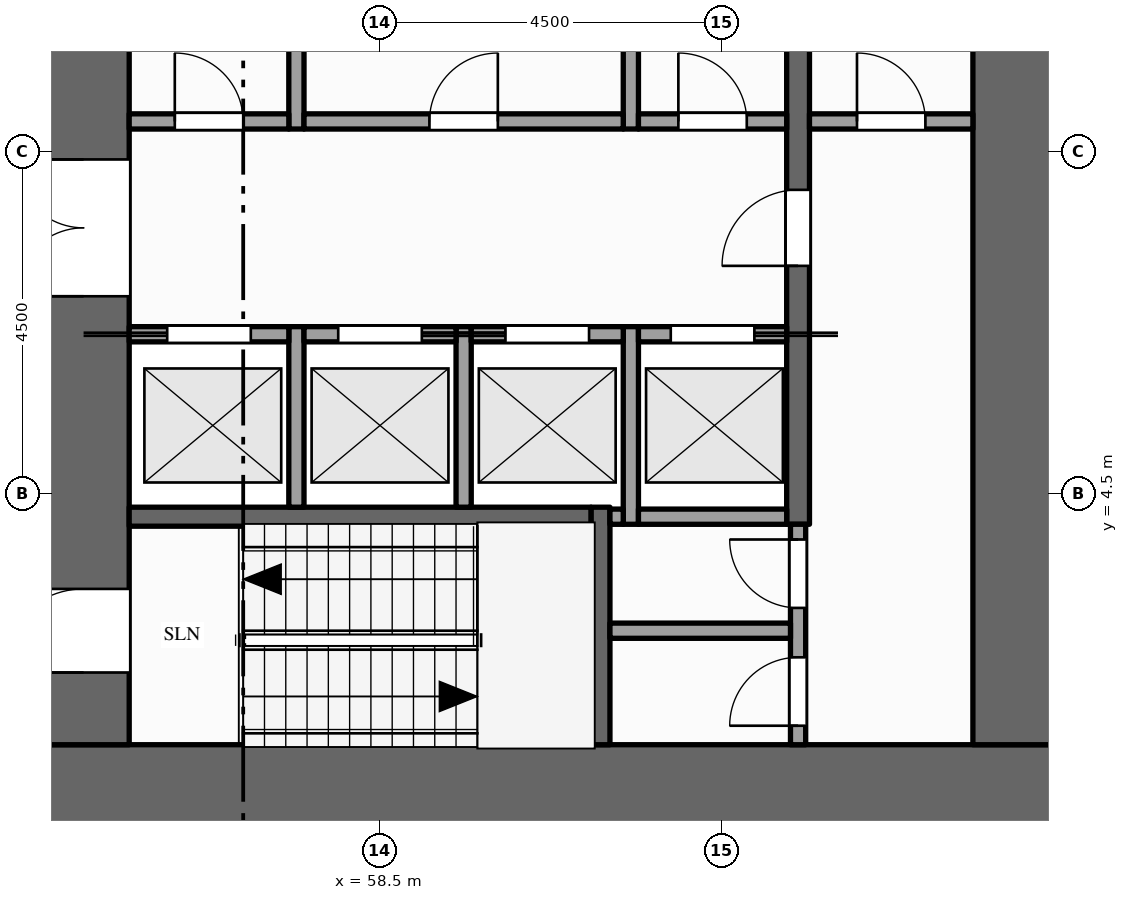
"""IFC4 building model, lengths in metres.
Left out: names, types, materials, properties, quantities, classifications, styles, units other than length and angle.
Written with IfcOpenShell. Run it as: python <this file> out.ifc"""

import sys

from ifc_helpers import new_model, si_unit, direction, frame, frame_2d, origin, place, context, subcontext, project, spatial, rectangle, extrude, element, fill, save


model = new_model("IFC4")
c1 = context("Model", 3, precision=1e-05, world=origin(), true_north=direction((0.0, 1.0)))
c2 = subcontext(c1, "Body", "Model", "MODEL_VIEW")
j1 = project(units=[si_unit("LENGTHUNIT", "METRE"), si_unit("PLANEANGLEUNIT", "RADIAN")], contexts=[c1])
p1 = place(None, origin())
s1 = spatial("IfcSite", under=j1, at=p1, CompositionType="ELEMENT")
p2 = place(p1, origin())
s2 = spatial("IfcBuilding", under=s1, at=p2, CompositionType="ELEMENT")
p3 = place(p2, frame((0.0, 0.0, 45.0)))
s3 = spatial("IfcBuildingStorey", under=s2, at=p3, CompositionType="ELEMENT", Elevation=45.0)
p4 = place(p3, frame((67.5, 0.6, -0.15), z_axis=(0.0, 0.0, 1.0), x_axis=(-1.0, 0.0, 0.0)))
e1 = element("IfcWall", 1, at=p4, inside=s3, PredefinedType="SHEAR", context=c2, shape_type="SweptSolid", body=[
    extrude(rectangle(XDim=13.5, YDim=1.2, at=frame_2d((6.75, 0.0))), origin(), (0.0, 0.0, 1.0), 4.0),
])
p5 = place(p3, frame((54.6, 1.2, -0.15), z_axis=(0.0, 0.0, 1.0), x_axis=(0.0, 1.0, 0.0)))
e2 = element("IfcWall", 2, at=p5, inside=s3, PredefinedType="SHEAR", context=c2, shape_type="SweptSolid", body=[
    extrude(rectangle(XDim=20.1, YDim=1.2, at=frame_2d((10.05, 0.0))), origin(), (0.0, 0.0, 1.0), 4.0),
])
p6 = place(p5, frame((5.9, 0.0, 0.15)))
e3 = element("IfcOpeningElement", 3, at=p6, cuts=e2, PredefinedType="OPENING", context=c2, shape_type="SweptSolid", body=[
    extrude(rectangle(XDim=1.8, YDim=2.1, at=frame_2d((0.9, 1.05))), frame((0.0, 0.61, 0.0), z_axis=(0.0, -1.0, 0.0), x_axis=(1.0, 0.0, 0.0)), (0.0, 0.0, 1.0), 1.22),
])
p7 = place(p5, frame((11.95, 0.0, 0.15)))
e4 = element("IfcOpeningElement", 4, at=p7, cuts=e2, PredefinedType="OPENING", context=c2, shape_type="SweptSolid", body=[
    extrude(rectangle(XDim=1.1, YDim=2.1, at=frame_2d((0.55, 1.05))), frame((0.0, 0.61, 0.0), z_axis=(0.0, -1.0, 0.0), x_axis=(1.0, 0.0, 0.0)), (0.0, 0.0, 1.0), 1.22),
])
p8 = place(p5, frame((0.95, 0.0, 0.15)))
e5 = element("IfcOpeningElement", 5, at=p8, cuts=e2, PredefinedType="OPENING", context=c2, shape_type="SweptSolid", body=[
    extrude(rectangle(XDim=1.1, YDim=2.1, at=frame_2d((0.55, 1.05))), frame((0.0, 0.61, 0.0), z_axis=(0.0, -1.0, 0.0), x_axis=(1.0, 0.0, 0.0)), (0.0, 0.0, 1.0), 1.22),
])
p9 = place(p5, frame((18.15, 0.0, 0.15)))
e6 = element("IfcOpeningElement", 6, at=p9, cuts=e2, PredefinedType="OPENING", context=c2, shape_type="SweptSolid", body=[
    extrude(rectangle(XDim=1.1, YDim=2.1, at=frame_2d((0.55, 1.05))), frame((0.0, 0.61, 0.0), z_axis=(0.0, -1.0, 0.0), x_axis=(1.0, 0.0, 0.0)), (0.0, 0.0, 1.0), 1.22),
])
p10 = place(p3, frame((66.9, 1.2, -0.15), z_axis=(0.0, 0.0, 1.0), x_axis=(0.0, 1.0, 0.0)))
e7 = element("IfcWall", 7, at=p10, inside=s3, PredefinedType="SHEAR", context=c2, shape_type="SweptSolid", body=[
    extrude(rectangle(XDim=20.1, YDim=1.2, at=frame_2d((10.05, 0.0))), origin(), (0.0, 0.0, 1.0), 4.0),
])
p11 = place(p3, frame((57.4, 4.325, 0.0), z_axis=(0.0, 0.0, 1.0), x_axis=(0.0, 1.0, 0.0)))
e8 = element("IfcWall", 8, at=p11, inside=s3, PredefinedType="SOLIDWALL", context=c2, shape_type="SweptSolid", body=[
    extrude(rectangle(XDim=2.375, YDim=0.2, at=frame_2d((1.188, 0.0))), origin(), (0.0, 0.0, 1.0), 3.85),
])
p12 = place(p3, frame((57.4, 9.3, 0.0), z_axis=(0.0, 0.0, 1.0), x_axis=(0.0, 1.0, 0.0)))
e9 = element("IfcWall", 9, at=p12, inside=s3, PredefinedType="PARTITIONING", context=c2, shape_type="SweptSolid", body=[
    extrude(rectangle(XDim=2.6, YDim=0.2, at=frame_2d((1.3, 0.0))), origin(), (0.0, 0.0, 1.0), 3.85),
])
p13 = place(p3, frame((59.6, 4.325, 0.0), z_axis=(0.0, 0.0, 1.0), x_axis=(0.0, 1.0, 0.0)))
e10 = element("IfcWall", 10, at=p13, inside=s3, PredefinedType="SOLIDWALL", context=c2, shape_type="SweptSolid", body=[
    extrude(rectangle(XDim=2.375, YDim=0.2, at=frame_2d((1.188, 0.0))), origin(), (0.0, 0.0, 1.0), 3.85),
])
p14 = place(p3, frame((61.4, 1.2, 0.0), z_axis=(0.0, 0.0, 1.0), x_axis=(0.0, 1.0, 0.0)))
e11 = element("IfcWall", 11, at=p14, inside=s3, PredefinedType="SHEAR", context=c2, shape_type="SweptSolid", body=[
    extrude(rectangle(XDim=3.125, YDim=0.25, at=frame_2d((1.562, 0.0))), origin(), (0.0, 0.0, 1.0), 3.85),
])
p15 = place(p3, frame((61.8, 4.1, 0.0), z_axis=(0.0, 0.0, 1.0), x_axis=(0.0, 1.0, 0.0)))
e12 = element("IfcWall", 12, at=p15, inside=s3, PredefinedType="SOLIDWALL", context=c2, shape_type="SweptSolid", body=[
    extrude(rectangle(XDim=2.6, YDim=0.2, at=frame_2d((1.3, 0.0))), origin(), (0.0, 0.0, 1.0), 3.85),
])
p16 = place(p3, frame((61.8, 9.3, 0.0), z_axis=(0.0, 0.0, 1.0), x_axis=(0.0, 1.0, 0.0)))
e13 = element("IfcWall", 13, at=p16, inside=s3, PredefinedType="PARTITIONING", context=c2, shape_type="SweptSolid", body=[
    extrude(rectangle(XDim=2.6, YDim=0.2, at=frame_2d((1.3, 0.0))), origin(), (0.0, 0.0, 1.0), 3.85),
])
p17 = place(p3, frame((64.0, 1.2, 0.0), z_axis=(0.0, 0.0, 1.0), x_axis=(0.0, 1.0, 0.0)))
e14 = element("IfcWall", 14, at=p17, inside=s3, PredefinedType="PARTITIONING", context=c2, shape_type="SweptSolid", body=[
    extrude(rectangle(XDim=2.9, YDim=0.2, at=frame_2d((1.45, 0.0))), origin(), (0.0, 0.0, 1.0), 3.85),
])
p18 = place(p17, frame((0.25, 0.0, 0.0)))
e15 = element("IfcOpeningElement", 15, at=p18, cuts=e14, PredefinedType="OPENING", context=c2, shape_type="SweptSolid", body=[
    extrude(rectangle(XDim=0.9, YDim=2.1, at=frame_2d((0.45, 1.05))), frame((0.0, 0.11, 0.0), z_axis=(0.0, -1.0, 0.0), x_axis=(1.0, 0.0, 0.0)), (0.0, 0.0, 1.0), 0.22),
])
p19 = place(p17, frame((1.8, 0.0, 0.0)))
e16 = element("IfcOpeningElement", 16, at=p19, cuts=e14, PredefinedType="OPENING", context=c2, shape_type="SweptSolid", body=[
    extrude(rectangle(XDim=0.9, YDim=2.1, at=frame_2d((0.45, 1.05))), frame((0.0, 0.11, 0.0), z_axis=(0.0, -1.0, 0.0), x_axis=(1.0, 0.0, 0.0)), (0.0, 0.0, 1.0), 0.22),
])
p20 = place(p3, frame((64.0, 4.1, 0.0), z_axis=(0.0, 0.0, 1.0), x_axis=(0.0, 1.0, 0.0)))
e17 = element("IfcWall", 17, at=p20, inside=s3, PredefinedType="SHEAR", context=c2, shape_type="SweptSolid", body=[
    extrude(rectangle(XDim=14.5, YDim=0.3, at=frame_2d((7.25, 0.0))), origin(), (0.0, 0.0, 1.0), 3.85),
])
p21 = place(p20, frame((3.4, 0.0, 0.0)))
e18 = element("IfcOpeningElement", 18, at=p21, cuts=e17, PredefinedType="OPENING", context=c2, shape_type="SweptSolid", body=[
    extrude(rectangle(XDim=1.0, YDim=2.1, at=frame_2d((0.5, 1.05))), frame((0.0, 0.16, 0.0), z_axis=(0.0, -1.0, 0.0), x_axis=(1.0, 0.0, 0.0)), (0.0, 0.0, 1.0), 0.32),
])
p22 = place(p20, frame((9.1, 0.0, 0.0)))
e19 = element("IfcOpeningElement", 19, at=p22, cuts=e17, PredefinedType="OPENING", context=c2, shape_type="SweptSolid", body=[
    extrude(rectangle(XDim=1.0, YDim=2.1, at=frame_2d((0.5, 1.05))), frame((0.0, 0.16, 0.0), z_axis=(0.0, -1.0, 0.0), x_axis=(1.0, 0.0, 0.0)), (0.0, 0.0, 1.0), 0.32),
])
p23 = place(p3, frame((61.525, 2.7, 0.0), z_axis=(0.0, 0.0, 1.0), x_axis=(1.0, 0.0, 0.0)))
e20 = element("IfcWall", 20, at=p23, inside=s3, PredefinedType="PARTITIONING", context=c2, shape_type="SweptSolid", body=[
    extrude(rectangle(XDim=2.375, YDim=0.2, at=frame_2d((1.188, 0.0))), origin(), (0.0, 0.0, 1.0), 3.85),
])
p24 = place(p3, frame((55.2, 4.2, 0.0), z_axis=(0.0, 0.0, 1.0), x_axis=(1.0, 0.0, 0.0)))
e21 = element("IfcWall", 21, at=p24, inside=s3, PredefinedType="SHEAR", context=c2, shape_type="SweptSolid", body=[
    extrude(rectangle(XDim=6.075, YDim=0.25, at=frame_2d((3.038, 0.0))), origin(), (0.0, 0.0, 1.0), 3.85),
])
p25 = place(p3, frame((61.525, 4.2, 0.0), z_axis=(0.0, 0.0, 1.0), x_axis=(1.0, 0.0, 0.0)))
e22 = element("IfcWall", 22, at=p25, inside=s3, PredefinedType="SOLIDWALL", context=c2, shape_type="SweptSolid", body=[
    extrude(rectangle(XDim=0.175, YDim=0.2, at=frame_2d((0.087, 0.0))), origin(), (0.0, 0.0, 1.0), 3.85),
])
p26 = place(p3, frame((61.9, 4.2, 0.0), z_axis=(0.0, 0.0, 1.0), x_axis=(1.0, 0.0, 0.0)))
e23 = element("IfcWall", 23, at=p26, inside=s3, PredefinedType="SOLIDWALL", context=c2, shape_type="SweptSolid", body=[
    extrude(rectangle(XDim=1.95, YDim=0.2, at=frame_2d((0.975, 0.0))), origin(), (0.0, 0.0, 1.0), 3.85),
])
p27 = place(p3, frame((55.2, 6.6, 0.0), z_axis=(0.0, 0.0, 1.0), x_axis=(1.0, 0.0, 0.0)))
e24 = element("IfcWall", 24, at=p27, inside=s3, PredefinedType="SOLIDWALL", context=c2, shape_type="SweptSolid", body=[
    extrude(rectangle(XDim=2.1, YDim=0.2, at=frame_2d((1.05, 0.0))), origin(), (0.0, 0.0, 1.0), 3.85),
])
p28 = place(p27, frame((0.5, 0.0, 0.012)))
e25 = element("IfcOpeningElement", 25, at=p28, cuts=e24, PredefinedType="OPENING", context=c2, shape_type="SweptSolid", body=[
    extrude(rectangle(XDim=1.1, YDim=2.1, at=frame_2d((0.55, 1.05))), frame((0.0, 0.11, 0.0), z_axis=(0.0, -1.0, 0.0), x_axis=(1.0, 0.0, 0.0)), (0.0, 0.0, 1.0), 0.22),
])
p29 = place(p3, frame((57.5, 6.6, 0.0), z_axis=(0.0, 0.0, 1.0), x_axis=(1.0, 0.0, 0.0)))
e26 = element("IfcWall", 26, at=p29, inside=s3, PredefinedType="SOLIDWALL", context=c2, shape_type="SweptSolid", body=[
    extrude(rectangle(XDim=2.0, YDim=0.2, at=frame_2d((1.0, 0.0))), origin(), (0.0, 0.0, 1.0), 3.85),
])
p30 = place(p29, frame((0.45, 0.0, 0.012)))
e27 = element("IfcOpeningElement", 27, at=p30, cuts=e26, PredefinedType="OPENING", context=c2, shape_type="SweptSolid", body=[
    extrude(rectangle(XDim=1.1, YDim=2.1, at=frame_2d((0.55, 1.05))), frame((0.0, 0.11, 0.0), z_axis=(0.0, -1.0, 0.0), x_axis=(1.0, 0.0, 0.0)), (0.0, 0.0, 1.0), 0.22),
])
p31 = place(p3, frame((59.7, 6.6, 0.0), z_axis=(0.0, 0.0, 1.0), x_axis=(1.0, 0.0, 0.0)))
e28 = element("IfcWall", 28, at=p31, inside=s3, PredefinedType="SOLIDWALL", context=c2, shape_type="SweptSolid", body=[
    extrude(rectangle(XDim=2.0, YDim=0.2, at=frame_2d((1.0, 0.0))), origin(), (0.0, 0.0, 1.0), 3.85),
])
p32 = place(p31, frame((0.45, 0.0, 0.012)))
e29 = element("IfcOpeningElement", 29, at=p32, cuts=e28, PredefinedType="OPENING", context=c2, shape_type="SweptSolid", body=[
    extrude(rectangle(XDim=1.1, YDim=2.1, at=frame_2d((0.55, 1.05))), frame((0.0, 0.11, 0.0), z_axis=(0.0, -1.0, 0.0), x_axis=(1.0, 0.0, 0.0)), (0.0, 0.0, 1.0), 0.22),
])
p33 = place(p3, frame((61.9, 6.6, 0.0), z_axis=(0.0, 0.0, 1.0), x_axis=(1.0, 0.0, 0.0)))
e30 = element("IfcWall", 30, at=p33, inside=s3, PredefinedType="SOLIDWALL", context=c2, shape_type="SweptSolid", body=[
    extrude(rectangle(XDim=1.95, YDim=0.2, at=frame_2d((0.975, 0.0))), origin(), (0.0, 0.0, 1.0), 3.85),
])
p34 = place(p33, frame((0.425, 0.0, 0.012)))
e31 = element("IfcOpeningElement", 31, at=p34, cuts=e30, PredefinedType="OPENING", context=c2, shape_type="SweptSolid", body=[
    extrude(rectangle(XDim=1.1, YDim=2.1, at=frame_2d((0.55, 1.05))), frame((0.0, 0.11, 0.0), z_axis=(0.0, -1.0, 0.0), x_axis=(1.0, 0.0, 0.0)), (0.0, 0.0, 1.0), 0.22),
])
p35 = place(p3, frame((55.2, 9.4, 0.0), z_axis=(0.0, 0.0, 1.0), x_axis=(1.0, 0.0, 0.0)))
e32 = element("IfcWall", 32, at=p35, inside=s3, PredefinedType="PARTITIONING", context=c2, shape_type="SweptSolid", body=[
    extrude(rectangle(XDim=2.1, YDim=0.2, at=frame_2d((1.05, 0.0))), origin(), (0.0, 0.0, 1.0), 3.85),
])
p36 = place(p35, frame((0.6, 0.0, 0.0)))
e33 = element("IfcOpeningElement", 33, at=p36, cuts=e32, PredefinedType="OPENING", context=c2, shape_type="SweptSolid", body=[
    extrude(rectangle(XDim=0.9, YDim=2.1, at=frame_2d((0.45, 1.05))), frame((0.0, 0.11, 0.0), z_axis=(0.0, -1.0, 0.0), x_axis=(1.0, 0.0, 0.0)), (0.0, 0.0, 1.0), 0.22),
])
p37 = place(p3, frame((57.5, 9.4, 0.0), z_axis=(0.0, 0.0, 1.0), x_axis=(1.0, 0.0, 0.0)))
e34 = element("IfcWall", 34, at=p37, inside=s3, PredefinedType="PARTITIONING", context=c2, shape_type="SweptSolid", body=[
    extrude(rectangle(XDim=4.2, YDim=0.2, at=frame_2d((2.1, 0.0))), origin(), (0.0, 0.0, 1.0), 3.85),
])
p38 = place(p37, frame((1.65, 0.0, 0.0)))
e35 = element("IfcOpeningElement", 35, at=p38, cuts=e34, PredefinedType="OPENING", context=c2, shape_type="SweptSolid", body=[
    extrude(rectangle(XDim=0.9, YDim=2.1, at=frame_2d((0.45, 1.05))), frame((0.0, 0.11, 0.0), z_axis=(0.0, -1.0, 0.0), x_axis=(1.0, 0.0, 0.0)), (0.0, 0.0, 1.0), 0.22),
])
p39 = place(p3, frame((61.9, 9.4, 0.0), z_axis=(0.0, 0.0, 1.0), x_axis=(1.0, 0.0, 0.0)))
e36 = element("IfcWall", 36, at=p39, inside=s3, PredefinedType="PARTITIONING", context=c2, shape_type="SweptSolid", body=[
    extrude(rectangle(XDim=1.95, YDim=0.2, at=frame_2d((0.975, 0.0))), origin(), (0.0, 0.0, 1.0), 3.85),
])
p40 = place(p39, frame((0.525, 0.0, 0.0)))
e37 = element("IfcOpeningElement", 37, at=p40, cuts=e36, PredefinedType="OPENING", context=c2, shape_type="SweptSolid", body=[
    extrude(rectangle(XDim=0.9, YDim=2.1, at=frame_2d((0.45, 1.05))), frame((0.0, 0.11, 0.0), z_axis=(0.0, -1.0, 0.0), x_axis=(1.0, 0.0, 0.0)), (0.0, 0.0, 1.0), 0.22),
])
p41 = place(p3, frame((64.15, 9.4, 0.0), z_axis=(0.0, 0.0, 1.0), x_axis=(1.0, 0.0, 0.0)))
e38 = element("IfcWall", 38, at=p41, inside=s3, PredefinedType="PARTITIONING", context=c2, shape_type="SweptSolid", body=[
    extrude(rectangle(XDim=2.15, YDim=0.2, at=frame_2d((1.075, 0.0))), origin(), (0.0, 0.0, 1.0), 3.85),
])
p42 = place(p41, frame((0.625, 0.0, 0.0)))
e39 = element("IfcOpeningElement", 39, at=p42, cuts=e38, PredefinedType="OPENING", context=c2, shape_type="SweptSolid", body=[
    extrude(rectangle(XDim=0.9, YDim=2.1, at=frame_2d((0.45, 1.05))), frame((0.0, 0.11, 0.0), z_axis=(0.0, -1.0, 0.0), x_axis=(1.0, 0.0, 0.0)), (0.0, 0.0, 1.0), 0.22),
])
p43 = place(p28, origin())
e40 = element("IfcDoor", 40, at=p43, inside=s3, OperationType="SLIDING_TO_LEFT", PredefinedType="DOOR", context=c2, shape_type="SweptSolid", body=[
    extrude(rectangle(XDim=1.1, YDim=2.1, at=frame_2d((0.55, 1.05))), frame((0.0, 0.025, 0.0), z_axis=(0.0, -1.0, 0.0), x_axis=(1.0, 0.0, 0.0)), (0.0, 0.0, 1.0), 0.05),
])
fill(e25, e40)
p44 = place(p30, origin())
e41 = element("IfcDoor", 41, at=p44, inside=s3, OperationType="SLIDING_TO_RIGHT", PredefinedType="DOOR", context=c2, shape_type="SweptSolid", body=[
    extrude(rectangle(XDim=1.1, YDim=2.1, at=frame_2d((0.55, 1.05))), frame((0.0, 0.025, 0.0), z_axis=(0.0, -1.0, 0.0), x_axis=(1.0, 0.0, 0.0)), (0.0, 0.0, 1.0), 0.05),
])
fill(e27, e41)
p45 = place(p32, origin())
e42 = element("IfcDoor", 42, at=p45, inside=s3, OperationType="SLIDING_TO_LEFT", PredefinedType="DOOR", context=c2, shape_type="SweptSolid", body=[
    extrude(rectangle(XDim=1.1, YDim=2.1, at=frame_2d((0.55, 1.05))), frame((0.0, 0.025, 0.0), z_axis=(0.0, -1.0, 0.0), x_axis=(1.0, 0.0, 0.0)), (0.0, 0.0, 1.0), 0.05),
])
fill(e29, e42)
p46 = place(p34, origin())
e43 = element("IfcDoor", 43, at=p46, inside=s3, OperationType="SLIDING_TO_RIGHT", PredefinedType="DOOR", context=c2, shape_type="SweptSolid", body=[
    extrude(rectangle(XDim=1.1, YDim=2.1, at=frame_2d((0.55, 1.05))), frame((0.0, 0.025, 0.0), z_axis=(0.0, -1.0, 0.0), x_axis=(1.0, 0.0, 0.0)), (0.0, 0.0, 1.0), 0.05),
])
fill(e31, e43)
p47 = place(p6, origin())
e44 = element("IfcDoor", 44, at=p47, inside=s3, OperationType="DOUBLE_DOOR_SINGLE_SWING", PredefinedType="DOOR", context=c2, shape_type="SweptSolid", body=[
    extrude(rectangle(XDim=1.8, YDim=2.1, at=frame_2d((0.9, 1.05))), frame((0.0, 0.025, 0.0), z_axis=(0.0, -1.0, 0.0), x_axis=(1.0, 0.0, 0.0)), (0.0, 0.0, 1.0), 0.05),
])
fill(e3, e44)
p48 = place(p21, origin())
e45 = element("IfcDoor", 45, at=p48, inside=s3, OperationType="SINGLE_SWING_LEFT", PredefinedType="DOOR", context=c2, shape_type="SweptSolid", body=[
    extrude(rectangle(XDim=1.0, YDim=2.1, at=frame_2d((0.5, 1.05))), frame((0.0, 0.025, 0.0), z_axis=(0.0, -1.0, 0.0), x_axis=(1.0, 0.0, 0.0)), (0.0, 0.0, 1.0), 0.05),
])
fill(e18, e45)
p49 = place(p42, origin())
e46 = element("IfcDoor", 46, at=p49, inside=s3, OperationType="SINGLE_SWING_LEFT", PredefinedType="DOOR", context=c2, shape_type="SweptSolid", body=[
    extrude(rectangle(XDim=0.9, YDim=2.1, at=frame_2d((0.45, 1.05))), frame((0.0, 0.025, 0.0), z_axis=(0.0, -1.0, 0.0), x_axis=(1.0, 0.0, 0.0)), (0.0, 0.0, 1.0), 0.05),
])
fill(e39, e46)
p50 = place(p8, origin())
e47 = element("IfcDoor", 47, at=p50, inside=s3, OperationType="SINGLE_SWING_LEFT", PredefinedType="DOOR", context=c2, shape_type="SweptSolid", body=[
    extrude(rectangle(XDim=1.1, YDim=2.1, at=frame_2d((0.55, 1.05))), frame((0.0, 0.025, 0.0), z_axis=(0.0, -1.0, 0.0), x_axis=(1.0, 0.0, 0.0)), (0.0, 0.0, 1.0), 0.05),
])
fill(e5, e47)
p51 = place(p18, origin())
e48 = element("IfcDoor", 48, at=p51, inside=s3, OperationType="SINGLE_SWING_LEFT", PredefinedType="DOOR", context=c2, shape_type="SweptSolid", body=[
    extrude(rectangle(XDim=0.9, YDim=2.1, at=frame_2d((0.45, 1.05))), frame((0.0, 0.025, 0.0), z_axis=(0.0, -1.0, 0.0), x_axis=(1.0, 0.0, 0.0)), (0.0, 0.0, 1.0), 0.05),
])
fill(e15, e48)
p52 = place(p19, origin())
e49 = element("IfcDoor", 49, at=p52, inside=s3, OperationType="SINGLE_SWING_RIGHT", PredefinedType="DOOR", context=c2, shape_type="SweptSolid", body=[
    extrude(rectangle(XDim=0.9, YDim=2.1, at=frame_2d((0.45, 1.05))), frame((0.0, 0.025, 0.0), z_axis=(0.0, -1.0, 0.0), x_axis=(1.0, 0.0, 0.0)), (0.0, 0.0, 1.0), 0.05),
])
fill(e16, e49)
p53 = place(p36, origin())
e50 = element("IfcDoor", 50, at=p53, inside=s3, OperationType="SINGLE_SWING_LEFT", PredefinedType="DOOR", context=c2, shape_type="SweptSolid", body=[
    extrude(rectangle(XDim=0.9, YDim=2.1, at=frame_2d((0.45, 1.05))), frame((0.0, 0.025, 0.0), z_axis=(0.0, -1.0, 0.0), x_axis=(1.0, 0.0, 0.0)), (0.0, 0.0, 1.0), 0.05),
])
fill(e33, e50)
p54 = place(p38, origin())
e51 = element("IfcDoor", 51, at=p54, inside=s3, OperationType="SINGLE_SWING_RIGHT", PredefinedType="DOOR", context=c2, shape_type="SweptSolid", body=[
    extrude(rectangle(XDim=0.9, YDim=2.1, at=frame_2d((0.45, 1.05))), frame((0.0, 0.025, 0.0), z_axis=(0.0, -1.0, 0.0), x_axis=(1.0, 0.0, 0.0)), (0.0, 0.0, 1.0), 0.05),
])
fill(e35, e51)
p55 = place(p40, origin())
e52 = element("IfcDoor", 52, at=p55, inside=s3, OperationType="SINGLE_SWING_LEFT", PredefinedType="DOOR", context=c2, shape_type="SweptSolid", body=[
    extrude(rectangle(XDim=0.9, YDim=2.1, at=frame_2d((0.45, 1.05))), frame((0.0, 0.025, 0.0), z_axis=(0.0, -1.0, 0.0), x_axis=(1.0, 0.0, 0.0)), (0.0, 0.0, 1.0), 0.05),
])
fill(e37, e52)
save(model, sys.argv[1])
